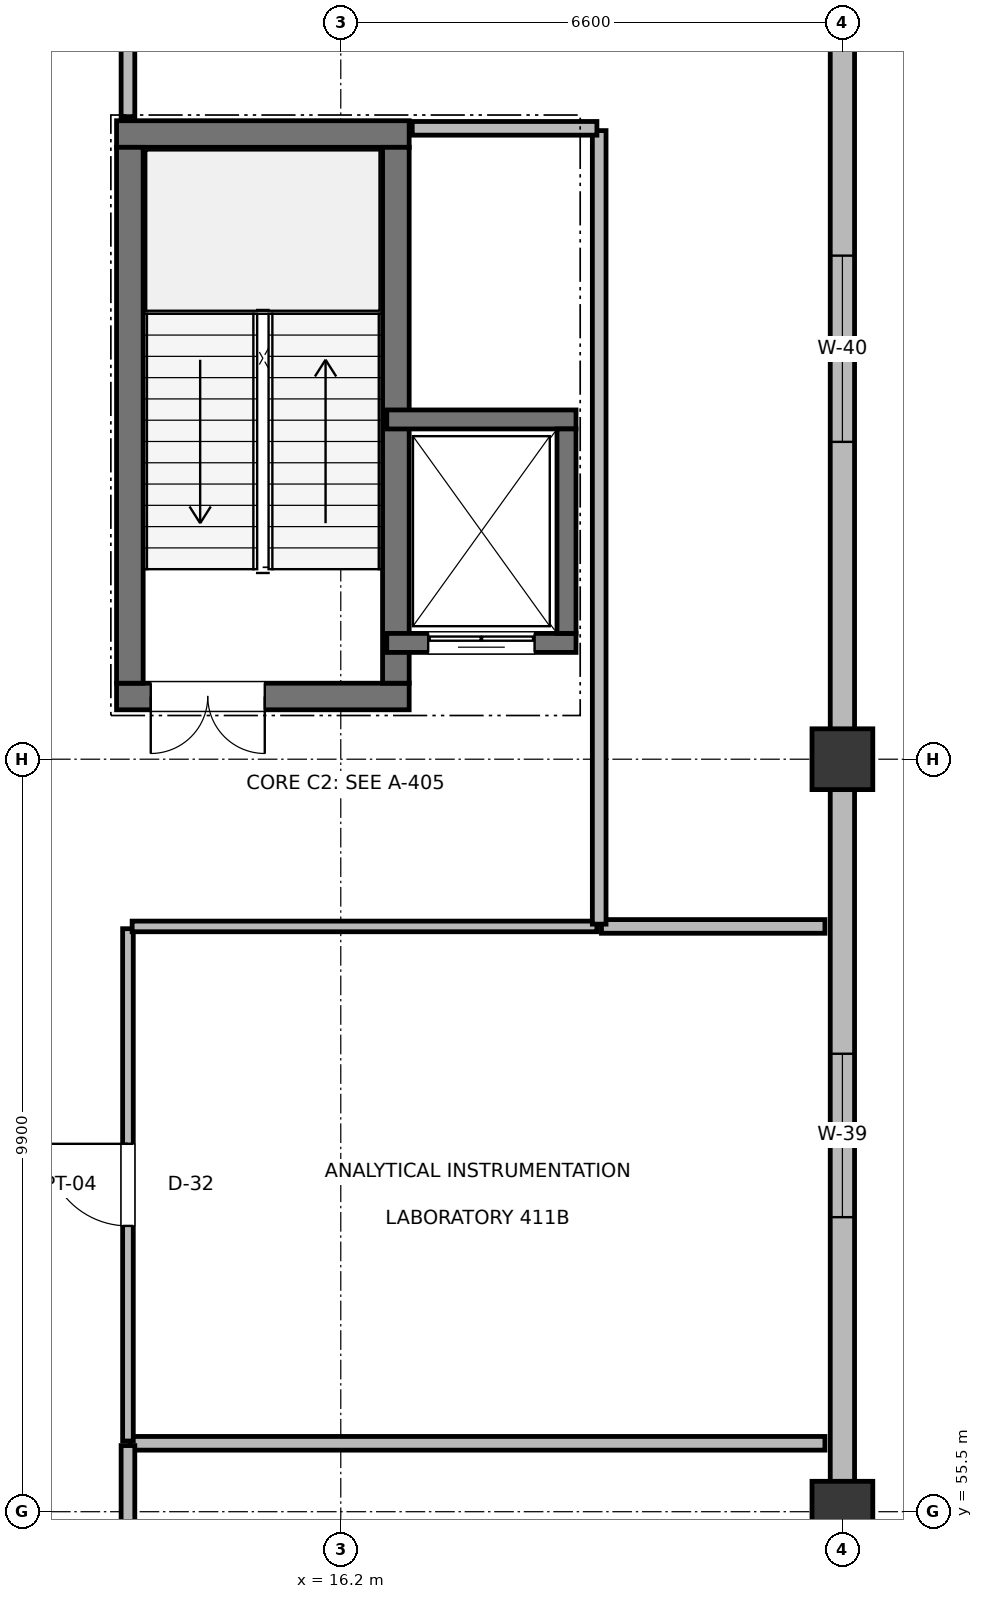
"""IFC4 building model, lengths in metres.
Left out: names, types, materials, properties, quantities, classifications, styles, units other than length and angle.
Written with IfcOpenShell. Run it as: python <this file> out.ifc"""

import sys

from ifc_helpers import new_model, si_unit, direction, frame, frame_2d, origin, origin_2d, place, context, subcontext, project, spatial, rectangle, extrude, element, fill, save


model = new_model("IFC4")
c1 = context("Model", 3, precision=1e-05, world=origin(), true_north=direction((0.0, 1.0)))
c2 = subcontext(c1, "Body", "Model", "MODEL_VIEW")
j1 = project(units=[si_unit("LENGTHUNIT", "METRE"), si_unit("PLANEANGLEUNIT", "RADIAN")], contexts=[c1])
p1 = place(None, origin())
s1 = spatial("IfcSite", under=j1, at=p1, CompositionType="ELEMENT")
p2 = place(p1, origin())
s2 = spatial("IfcBuilding", under=s1, at=p2, CompositionType="ELEMENT")
p3 = place(p2, frame((0.0, 0.0, 19.5)))
s3 = spatial("IfcBuildingStorey", under=s2, at=p3, CompositionType="ELEMENT", Elevation=19.5)
for number, where, z_axis, x_axis in (
    (1, (22.8, 55.5, 0.0), (0.0, 0.0, 1.0), (1.0, 0.0, 0.0)),
    (2, (22.8, 65.4, 0.0), (0.0, 0.0, 1.0), (1.0, 0.0, 0.0)),
):
    element("IfcColumn", number, at=place(p3, frame(where, z_axis=z_axis, x_axis=x_axis)), inside=s3, PredefinedType="COLUMN", context=c2, shape_type="SweptSolid", body=[
        extrude(rectangle(XDim=0.8, YDim=0.8, at=origin_2d()), origin(), (0.0, 0.0, 1.0), 4.5),
    ])
p4 = place(p3, frame((22.8, 55.885, 0.0), z_axis=(0.0, 0.0, 1.0), x_axis=(0.0, 1.0, 0.0)))
e3 = element("IfcWall", 3, at=p4, inside=s3, PredefinedType="SOLIDWALL", context=c2, shape_type="SweptSolid", body=[
    extrude(rectangle(XDim=9.13, YDim=0.32, at=frame_2d((4.565, 0.0))), origin(), (0.0, 0.0, 1.0), 3.325),
])
p5 = place(p4, frame((3.49, 0.0, 0.9)))
e4 = element("IfcOpeningElement", 4, at=p5, cuts=e3, PredefinedType="OPENING", context=c2, shape_type="SweptSolid", body=[
    extrude(rectangle(XDim=2.15, YDim=1.7, at=frame_2d((1.075, 0.85))), frame((0.0, 0.17, 0.0), z_axis=(0.0, -1.0, 0.0), x_axis=(1.0, 0.0, 0.0)), (0.0, 0.0, 1.0), 0.34),
])
p6 = place(p3, frame((22.8, 65.785, 0.0), z_axis=(0.0, 0.0, 1.0), x_axis=(0.0, 1.0, 0.0)))
e5 = element("IfcWall", 5, at=p6, inside=s3, PredefinedType="SOLIDWALL", context=c2, shape_type="SweptSolid", body=[
    extrude(rectangle(XDim=10.03, YDim=0.32, at=frame_2d((5.015, 0.0))), origin(), (0.0, 0.0, 1.0), 3.325),
])
p7 = place(p6, frame((3.79, 0.0, 0.9)))
e6 = element("IfcOpeningElement", 6, at=p7, cuts=e5, PredefinedType="OPENING", context=c2, shape_type="SweptSolid", body=[
    extrude(rectangle(XDim=2.45, YDim=1.8, at=frame_2d((1.225, 0.9))), frame((0.0, 0.17, 0.0), z_axis=(0.0, -1.0, 0.0), x_axis=(1.0, 0.0, 0.0)), (0.0, 0.0, 1.0), 0.34),
])
p8 = place(p3, frame((13.25, 66.225, 0.0), z_axis=(0.0, 0.0, 1.0), x_axis=(1.0, 0.0, 0.0)))
e7 = element("IfcWall", 7, at=p8, inside=s3, PredefinedType="SHEAR", context=c2, shape_type="SweptSolid", body=[
    extrude(rectangle(XDim=3.85, YDim=0.35, at=frame_2d((1.925, 0.0))), origin(), (0.0, 0.0, 1.0), 4.28),
])
p9 = place(p8, frame((0.45, 0.0, 0.0)))
e8 = element("IfcOpeningElement", 8, at=p9, cuts=e7, PredefinedType="OPENING", context=c2, shape_type="SweptSolid", body=[
    extrude(rectangle(XDim=1.5, YDim=2.2, at=frame_2d((0.75, 1.1))), frame((0.0, 0.185, 0.0), z_axis=(0.0, -1.0, 0.0), x_axis=(1.0, 0.0, 0.0)), (0.0, 0.0, 1.0), 0.37),
])
p10 = place(p3, frame((13.25, 73.625, 0.0), z_axis=(0.0, 0.0, 1.0), x_axis=(1.0, 0.0, 0.0)))
e9 = element("IfcWall", 9, at=p10, inside=s3, PredefinedType="SHEAR", context=c2, shape_type="SweptSolid", body=[
    extrude(rectangle(XDim=3.85, YDim=0.35, at=frame_2d((1.925, 0.0))), origin(), (0.0, 0.0, 1.0), 4.28),
])
for number, where, z_axis, x_axis in (
    (10, (13.425, 66.4, 0.0), (0.0, 0.0, 1.0), (0.0, 1.0, 0.0)),
    (11, (16.925, 66.4, 0.0), (0.0, 0.0, 1.0), (0.0, 1.0, 0.0)),
):
    element("IfcWall", number, at=place(p3, frame(where, z_axis=z_axis, x_axis=x_axis)), inside=s3, PredefinedType="SHEAR", context=c2, shape_type="SweptSolid", body=[
        extrude(rectangle(XDim=7.05, YDim=0.35, at=frame_2d((3.525, 0.0))), origin(), (0.0, 0.0, 1.0), 4.28),
    ])
p11 = place(p3, frame((16.805, 66.93, 0.0), z_axis=(0.0, 0.0, 1.0), x_axis=(1.0, 0.0, 0.0)))
e12 = element("IfcWall", 12, at=p11, inside=s3, PredefinedType="SHEAR", context=c2, shape_type="SweptSolid", body=[
    extrude(rectangle(XDim=2.49, YDim=0.25, at=frame_2d((1.245, 0.0))), origin(), (0.0, 0.0, 1.0), 4.26),
])
p12 = place(p11, frame((0.545, 0.0, 0.0)))
e13 = element("IfcOpeningElement", 13, at=p12, cuts=e12, PredefinedType="OPENING", context=c2, shape_type="SweptSolid", body=[
    extrude(rectangle(XDim=1.4, YDim=2.3, at=frame_2d((0.7, 1.15))), frame((0.0, 0.135, 0.0), z_axis=(0.0, -1.0, 0.0), x_axis=(1.0, 0.0, 0.0)), (0.0, 0.0, 1.0), 0.27),
])
p13 = place(p3, frame((16.805, 69.87, 0.0), z_axis=(0.0, 0.0, 1.0), x_axis=(1.0, 0.0, 0.0)))
e14 = element("IfcWall", 14, at=p13, inside=s3, PredefinedType="SHEAR", context=c2, shape_type="SweptSolid", body=[
    extrude(rectangle(XDim=2.49, YDim=0.25, at=frame_2d((1.245, 0.0))), origin(), (0.0, 0.0, 1.0), 4.26),
])
p14 = place(p3, frame((19.17, 67.055, 0.0), z_axis=(0.0, 0.0, 1.0), x_axis=(0.0, 1.0, 0.0)))
e15 = element("IfcWall", 15, at=p14, inside=s3, PredefinedType="SHEAR", context=c2, shape_type="SweptSolid", body=[
    extrude(rectangle(XDim=2.69, YDim=0.25, at=frame_2d((1.345, 0.0))), origin(), (0.0, 0.0, 1.0), 4.26),
])
p15 = place(p3, frame((13.43, 56.4, 0.0), z_axis=(0.0, 0.0, 1.0), x_axis=(1.0, 0.0, 0.0)))
e16 = element("IfcWall", 16, at=p15, inside=s3, PredefinedType="PARTITIONING", context=c2, shape_type="SweptSolid", body=[
    extrude(rectangle(XDim=9.14, YDim=0.18, at=frame_2d((4.57, 0.0))), origin(), (0.0, 0.0, 1.0), 3.325),
])
p16 = place(p3, frame((13.4, 30.03, 0.0), z_axis=(0.0, 0.0, 1.0), x_axis=(0.0, 1.0, 0.0)))
e17 = element("IfcWall", 17, at=p16, inside=s3, PredefinedType="PARTITIONING", context=c2, shape_type="SweptSolid", body=[
    extrude(rectangle(XDim=26.34, YDim=0.18, at=frame_2d((13.17, 0.0))), origin(), (0.0, 0.0, 1.0), 3.295),
])
p17 = place(p16, frame((12.645, 0.0, 0.0)))
e18 = element("IfcOpeningElement", 18, at=p17, cuts=e17, PredefinedType="OPENING", context=c2, shape_type="SweptSolid", body=[
    extrude(rectangle(XDim=1.05, YDim=2.2, at=frame_2d((0.525, 1.1))), frame((0.0, 0.1, 0.0), z_axis=(0.0, -1.0, 0.0), x_axis=(1.0, 0.0, 0.0)), (0.0, 0.0, 1.0), 0.2),
])
p18 = place(p3, frame((19.63, 63.2, 0.0), z_axis=(0.0, 0.0, 1.0), x_axis=(1.0, 0.0, 0.0)))
e19 = element("IfcWall", 19, at=p18, inside=s3, PredefinedType="PARTITIONING", context=c2, shape_type="SweptSolid", body=[
    extrude(rectangle(XDim=2.94, YDim=0.18, at=frame_2d((1.47, 0.0))), origin(), (0.0, 0.0, 1.0), 3.325),
])
p19 = place(p3, frame((13.4, 56.43, 0.0), z_axis=(0.0, 0.0, 1.0), x_axis=(0.0, 1.0, 0.0)))
e20 = element("IfcWall", 20, at=p19, inside=s3, PredefinedType="PARTITIONING", context=c2, shape_type="SweptSolid", body=[
    extrude(rectangle(XDim=6.74, YDim=0.14, at=frame_2d((3.37, 0.0))), origin(), (0.0, 0.0, 1.0), 4.18),
])
p20 = place(p19, frame((2.83, 0.0, 0.0)))
e21 = element("IfcOpeningElement", 21, at=p20, cuts=e20, PredefinedType="OPENING", context=c2, shape_type="SweptSolid", body=[
    extrude(rectangle(XDim=1.08, YDim=2.15, at=frame_2d((0.54, 1.075))), frame((0.0, 0.08, 0.0), z_axis=(0.0, -1.0, 0.0), x_axis=(1.0, 0.0, 0.0)), (0.0, 0.0, 1.0), 0.16),
])
p21 = place(p3, frame((13.455, 63.2, 0.0), z_axis=(0.0, 0.0, 1.0), x_axis=(1.0, 0.0, 0.0)))
e22 = element("IfcWall", 22, at=p21, inside=s3, PredefinedType="PARTITIONING", context=c2, shape_type="SweptSolid", body=[
    extrude(rectangle(XDim=6.115, YDim=0.14, at=frame_2d((3.058, 0.0))), origin(), (0.0, 0.0, 1.0), 3.575),
])
p22 = place(p3, frame((13.4, 73.853, 0.0), z_axis=(0.0, 0.0, 1.0), x_axis=(0.0, 1.0, 0.0)))
e23 = element("IfcWall", 23, at=p22, inside=s3, PredefinedType="PARTITIONING", context=c2, shape_type="SweptSolid", body=[
    extrude(rectangle(XDim=11.117, YDim=0.18, at=frame_2d((5.558, 0.0))), origin(), (0.0, 0.0, 1.0), 3.255),
])
p23 = place(p22, frame((4.858, 0.0, 0.0)))
e24 = element("IfcOpeningElement", 24, at=p23, cuts=e23, PredefinedType="OPENING", context=c2, shape_type="SweptSolid", body=[
    extrude(rectangle(XDim=1.4, YDim=2.2, at=frame_2d((0.7, 1.1))), frame((0.0, 0.1, 0.0), z_axis=(0.0, -1.0, 0.0), x_axis=(1.0, 0.0, 0.0)), (0.0, 0.0, 1.0), 0.2),
])
p24 = place(p3, frame((19.6, 63.23, 0.0), z_axis=(0.0, 0.0, 1.0), x_axis=(0.0, 1.0, 0.0)))
e25 = element("IfcWall", 25, at=p24, inside=s3, PredefinedType="PARTITIONING", context=c2, shape_type="SweptSolid", body=[
    extrude(rectangle(XDim=10.44, YDim=0.18, at=frame_2d((5.22, 0.0))), origin(), (0.0, 0.0, 1.0), 3.315),
])
p25 = place(p3, frame((17.14, 73.7, 0.0), z_axis=(0.0, 0.0, 1.0), x_axis=(1.0, 0.0, 0.0)))
e26 = element("IfcWall", 26, at=p25, inside=s3, PredefinedType="PARTITIONING", context=c2, shape_type="SweptSolid", body=[
    extrude(rectangle(XDim=2.43, YDim=0.18, at=frame_2d((1.215, 0.0))), origin(), (0.0, 0.0, 1.0), 4.18),
])
p26 = place(p5, frame((2.15, 0.0, 0.0), z_axis=(0.0, 0.0, 1.0), x_axis=(-1.0, 0.0, 0.0)))
e27 = element("IfcWindow", 27, at=p26, inside=s3, PartitioningType="DOUBLE_PANEL_VERTICAL", PredefinedType="WINDOW", context=c2, shape_type="SweptSolid", body=[
    extrude(rectangle(XDim=2.15, YDim=1.7, at=frame_2d((1.075, 0.85))), frame((0.0, 0.03, 0.0), z_axis=(0.0, -1.0, 0.0), x_axis=(1.0, 0.0, 0.0)), (0.0, 0.0, 1.0), 0.06),
])
fill(e4, e27)
p27 = place(p7, frame((2.45, 0.0, 0.0), z_axis=(0.0, 0.0, 1.0), x_axis=(-1.0, 0.0, 0.0)))
e28 = element("IfcWindow", 28, at=p27, inside=s3, PartitioningType="DOUBLE_PANEL_VERTICAL", PredefinedType="WINDOW", context=c2, shape_type="SweptSolid", body=[
    extrude(rectangle(XDim=2.45, YDim=1.8, at=frame_2d((1.225, 0.9))), frame((0.0, 0.03, 0.0), z_axis=(0.0, -1.0, 0.0), x_axis=(1.0, 0.0, 0.0)), (0.0, 0.0, 1.0), 0.06),
])
fill(e6, e28)
p28 = place(p9, frame((1.5, 0.0, 0.0), z_axis=(0.0, 0.0, 1.0), x_axis=(-1.0, 0.0, 0.0)))
e29 = element("IfcDoor", 29, at=p28, inside=s3, OperationType="DOUBLE_DOOR_SINGLE_SWING", PredefinedType="DOOR", context=c2, shape_type="SweptSolid", body=[
    extrude(rectangle(XDim=1.5, YDim=2.2, at=frame_2d((0.75, 1.1))), frame((0.0, 0.025, 0.0), z_axis=(0.0, -1.0, 0.0), x_axis=(1.0, 0.0, 0.0)), (0.0, 0.0, 1.0), 0.05),
])
fill(e8, e29)
p29 = place(p12, frame((1.4, 0.0, 0.0), z_axis=(0.0, 0.0, 1.0), x_axis=(-1.0, 0.0, 0.0)))
e30 = element("IfcDoor", 30, at=p29, inside=s3, OperationType="DOUBLE_DOOR_SLIDING", PredefinedType="DOOR", context=c2, shape_type="SweptSolid", body=[
    extrude(rectangle(XDim=1.4, YDim=2.3, at=frame_2d((0.7, 1.15))), frame((0.0, 0.025, 0.0), z_axis=(0.0, -1.0, 0.0), x_axis=(1.0, 0.0, 0.0)), (0.0, 0.0, 1.0), 0.05),
])
fill(e13, e30)
p30 = place(p20, origin())
e31 = element("IfcDoor", 31, at=p30, inside=s3, OperationType="SINGLE_SWING_RIGHT", PredefinedType="DOOR", context=c2, shape_type="SweptSolid", body=[
    extrude(rectangle(XDim=1.08, YDim=2.15, at=frame_2d((0.54, 1.075))), frame((0.0, 0.025, 0.0), z_axis=(0.0, -1.0, 0.0), x_axis=(1.0, 0.0, 0.0)), (0.0, 0.0, 1.0), 0.05),
])
fill(e21, e31)
save(model, sys.argv[1])
